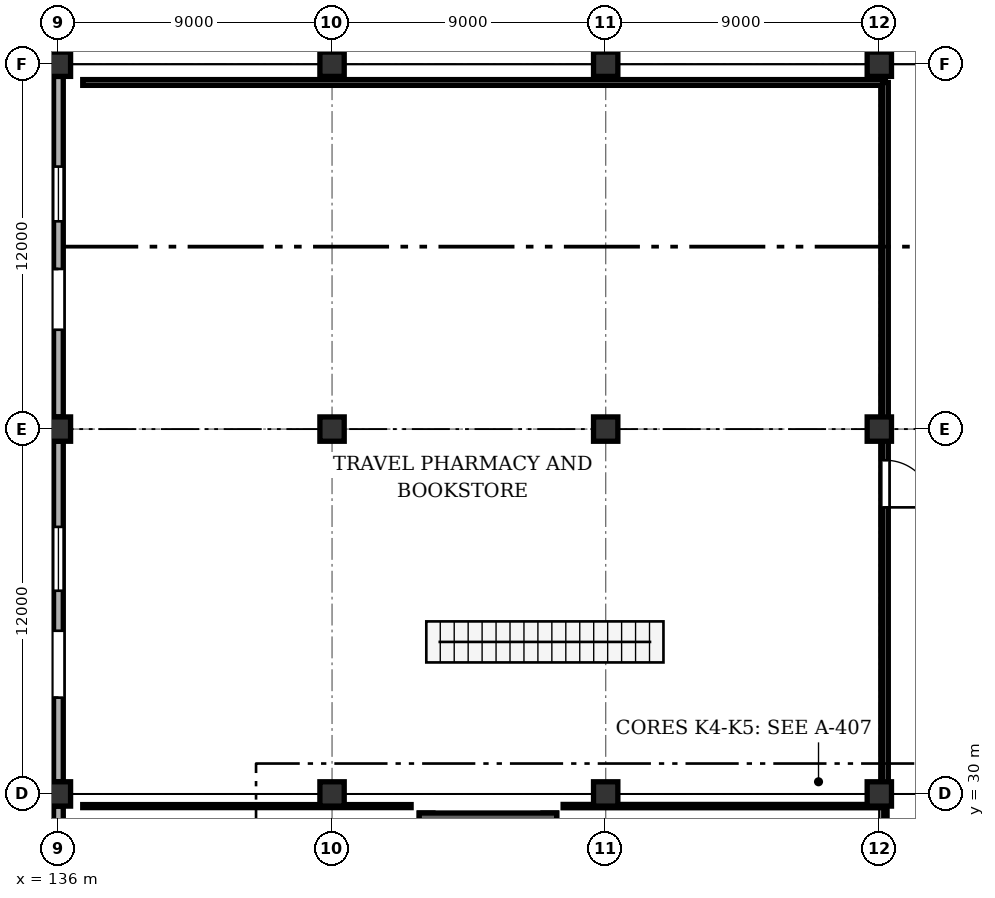
"""IFC4 building model, lengths in metres.
Left out: names, types, materials, properties, quantities, classifications, styles, units other than length and angle.
Written with IfcOpenShell. Run it as: python <this file> out.ifc"""

import sys

from ifc_helpers import new_model, si_unit, direction, frame, frame_2d, origin, origin_2d, place, context, subcontext, project, spatial, rectangle, extrude, element, fill, save


model = new_model("IFC4")
c1 = context("Model", 3, precision=1e-05, world=origin(), true_north=direction((0.0, 1.0)))
c2 = subcontext(c1, "Body", "Model", "MODEL_VIEW")
j1 = project(units=[si_unit("LENGTHUNIT", "METRE"), si_unit("PLANEANGLEUNIT", "RADIAN")], contexts=[c1])
p1 = place(None, origin())
s1 = spatial("IfcSite", under=j1, at=p1, CompositionType="ELEMENT")
p2 = place(p1, origin())
s2 = spatial("IfcBuilding", under=s1, at=p2, CompositionType="ELEMENT")
p3 = place(p2, origin())
s3 = spatial("IfcBuildingStorey", under=s2, at=p3, CompositionType="ELEMENT", Elevation=0.0)
for number, where, z_axis, x_axis in (
    (1, (136.0, 30.0, 0.0), (0.0, 0.0, 1.0), (1.0, 0.0, 0.0)),
    (2, (136.0, 42.0, 0.0), (0.0, 0.0, 1.0), (1.0, 0.0, 0.0)),
    (3, (136.0, 54.0, 0.0), (0.0, 0.0, 1.0), (1.0, 0.0, 0.0)),
    (4, (145.0, 30.0, 0.0), (0.0, 0.0, 1.0), (1.0, 0.0, 0.0)),
    (5, (145.0, 42.0, 0.0), (0.0, 0.0, 1.0), (1.0, 0.0, 0.0)),
    (6, (145.0, 54.0, 0.0), (0.0, 0.0, 1.0), (1.0, 0.0, 0.0)),
    (7, (154.0, 30.0, 0.0), (0.0, 0.0, 1.0), (1.0, 0.0, 0.0)),
    (8, (154.0, 42.0, 0.0), (0.0, 0.0, 1.0), (1.0, 0.0, 0.0)),
    (9, (154.0, 54.0, 0.0), (0.0, 0.0, 1.0), (1.0, 0.0, 0.0)),
    (10, (163.0, 30.0, 0.0), (0.0, 0.0, 1.0), (1.0, 0.0, 0.0)),
    (11, (163.0, 42.0, 0.0), (0.0, 0.0, 1.0), (1.0, 0.0, 0.0)),
    (12, (163.0, 54.0, 0.0), (0.0, 0.0, 1.0), (1.0, 0.0, 0.0)),
):
    element("IfcColumn", number, at=place(p3, frame(where, z_axis=z_axis, x_axis=x_axis)), inside=s3, PredefinedType="COLUMN", context=c2, shape_type="SweptSolid", body=[
        extrude(rectangle(XDim=0.8, YDim=0.8, at=origin_2d()), origin(), (0.0, 0.0, 1.0), 6.6),
    ])
p4 = place(p3, frame((136.0, 18.4, 0.0), z_axis=(0.0, 0.0, 1.0), x_axis=(0.0, 1.0, 0.0)))
e13 = element("IfcWall", 13, at=p4, inside=s3, PredefinedType="SOLIDWALL", context=c2, shape_type="SweptSolid", body=[
    extrude(rectangle(XDim=11.2, YDim=0.32, at=frame_2d((5.6, 0.0))), origin(), (0.0, 0.0, 1.0), 5.785),
])
p5 = place(p3, frame((136.0, 30.4, 0.0), z_axis=(0.0, 0.0, 1.0), x_axis=(0.0, 1.0, 0.0)))
e14 = element("IfcWall", 14, at=p5, inside=s3, PredefinedType="SOLIDWALL", context=c2, shape_type="SweptSolid", body=[
    extrude(rectangle(XDim=11.2, YDim=0.32, at=frame_2d((5.6, 0.0))), origin(), (0.0, 0.0, 1.0), 5.785),
])
p6 = place(p5, frame((2.767, 0.0, 0.0)))
e15 = element("IfcOpeningElement", 15, at=p6, cuts=e14, PredefinedType="OPENING", context=c2, shape_type="SweptSolid", body=[
    extrude(rectangle(XDim=2.2, YDim=2.45, at=frame_2d((1.1, 1.225))), frame((0.0, 0.17, 0.0), z_axis=(0.0, -1.0, 0.0), x_axis=(1.0, 0.0, 0.0)), (0.0, 0.0, 1.0), 0.34),
])
p7 = place(p5, frame((6.283, 0.0, 0.95)))
e16 = element("IfcOpeningElement", 16, at=p7, cuts=e14, PredefinedType="OPENING", context=c2, shape_type="SweptSolid", body=[
    extrude(rectangle(XDim=2.1, YDim=2.0, at=frame_2d((1.05, 1.0))), frame((0.0, 0.17, 0.0), z_axis=(0.0, -1.0, 0.0), x_axis=(1.0, 0.0, 0.0)), (0.0, 0.0, 1.0), 0.34),
])
p8 = place(p3, frame((136.0, 42.4, 0.0), z_axis=(0.0, 0.0, 1.0), x_axis=(0.0, 1.0, 0.0)))
e17 = element("IfcWall", 17, at=p8, inside=s3, PredefinedType="SOLIDWALL", context=c2, shape_type="SweptSolid", body=[
    extrude(rectangle(XDim=11.2, YDim=0.32, at=frame_2d((5.6, 0.0))), origin(), (0.0, 0.0, 1.0), 5.77),
])
p9 = place(p8, frame((2.867, 0.0, 0.0)))
e18 = element("IfcOpeningElement", 18, at=p9, cuts=e17, PredefinedType="OPENING", context=c2, shape_type="SweptSolid", body=[
    extrude(rectangle(XDim=2.0, YDim=2.4, at=frame_2d((1.0, 1.2))), frame((0.0, 0.17, 0.0), z_axis=(0.0, -1.0, 0.0), x_axis=(1.0, 0.0, 0.0)), (0.0, 0.0, 1.0), 0.34),
])
p10 = place(p8, frame((6.433, 0.0, 0.95)))
e19 = element("IfcOpeningElement", 19, at=p10, cuts=e17, PredefinedType="OPENING", context=c2, shape_type="SweptSolid", body=[
    extrude(rectangle(XDim=1.8, YDim=2.0, at=frame_2d((0.9, 1.0))), frame((0.0, 0.17, 0.0), z_axis=(0.0, -1.0, 0.0), x_axis=(1.0, 0.0, 0.0)), (0.0, 0.0, 1.0), 0.34),
])
for number, where, z_axis, x_axis in (
    (20, (152.163, 18.675, 0.0), (0.0, 0.0, 1.0), (0.0, 1.0, 0.0)),
    (21, (148.093, 29.373, 0.0), (0.0, 0.0, 1.0), (0.0, -1.0, 0.0)),
):
    element("IfcWall", number, at=place(p3, frame(where, z_axis=z_axis, x_axis=x_axis)), inside=s3, PredefinedType="SHEAR", context=c2, shape_type="SweptSolid", body=[
        extrude(rectangle(XDim=10.698, YDim=0.45, at=frame_2d((5.349, 0.0))), origin(), (0.0, 0.0, 1.0), 6.36),
    ])
p11 = place(p3, frame((152.387, 29.147, 0.0), z_axis=(0.0, 0.0, 1.0), x_axis=(-1.0, 0.0, 0.0)))
e22 = element("IfcWall", 22, at=p11, inside=s3, PredefinedType="SHEAR", context=c2, shape_type="SweptSolid", body=[
    extrude(rectangle(XDim=4.52, YDim=0.45, at=frame_2d((2.26, 0.0))), origin(), (0.0, 0.0, 1.0), 6.36),
])
p12 = place(p3, frame((152.6, 29.6, 0.0), z_axis=(0.0, 0.0, 1.0), x_axis=(1.0, 0.0, 0.0)))
e23 = element("IfcWall", 23, at=p12, inside=s3, PredefinedType="PARTITIONING", context=c2, shape_type="SweptSolid", body=[
    extrude(rectangle(XDim=10.6, YDim=0.11, at=frame_2d((5.3, 0.0))), origin(), (0.0, 0.0, 1.0), 4.4),
])
p13 = place(p3, frame((163.2, 29.6, 0.0), z_axis=(0.0, 0.0, 1.0), x_axis=(0.0, -1.0, 0.0)))
e24 = element("IfcWall", 24, at=p13, inside=s3, PredefinedType="PARTITIONING", context=c2, shape_type="SweptSolid", body=[
    extrude(rectangle(XDim=12.8, YDim=0.11, at=frame_2d((6.4, 0.0))), origin(), (0.0, 0.0, 1.0), 4.4),
])
p14 = place(p13, frame((5.625, 0.0, 0.0)))
e25 = element("IfcOpeningElement", 25, at=p14, cuts=e24, PredefinedType="OPENING", context=c2, shape_type="SweptSolid", body=[
    extrude(rectangle(XDim=1.55, YDim=2.1, at=frame_2d((0.775, 1.05))), frame((0.0, 0.065, 0.0), z_axis=(0.0, -1.0, 0.0), x_axis=(1.0, 0.0, 0.0)), (0.0, 0.0, 1.0), 0.13),
])
p15 = place(p3, frame((136.8, 29.6, 0.0), z_axis=(0.0, 0.0, 1.0), x_axis=(1.0, 0.0, 0.0)))
e26 = element("IfcWall", 26, at=p15, inside=s3, PredefinedType="PARTITIONING", context=c2, shape_type="SweptSolid", body=[
    extrude(rectangle(XDim=10.8, YDim=0.1, at=frame_2d((5.4, 0.0))), origin(), (0.0, 0.0, 1.0), 4.4),
])
p16 = place(p3, frame((136.8, 53.4, 0.0), z_axis=(0.0, 0.0, 1.0), x_axis=(1.0, 0.0, 0.0)))
e27 = element("IfcWall", 27, at=p16, inside=s3, PredefinedType="PARTITIONING", context=c2, shape_type="SweptSolid", body=[
    extrude(rectangle(XDim=26.4, YDim=0.19, at=frame_2d((13.2, 0.0))), origin(), (0.0, 0.0, 1.0), 4.4),
])
p17 = place(p3, frame((163.2, 53.4, 0.0), z_axis=(0.0, 0.0, 1.0), x_axis=(0.0, -1.0, 0.0)))
e28 = element("IfcWall", 28, at=p17, inside=s3, PredefinedType="PARTITIONING", context=c2, shape_type="SweptSolid", body=[
    extrude(rectangle(XDim=23.2, YDim=0.19, at=frame_2d((11.6, 0.0))), origin(), (0.0, 0.0, 1.0), 4.4),
])
p18 = place(p17, frame((12.425, 0.0, 0.0)))
e29 = element("IfcOpeningElement", 29, at=p18, cuts=e28, PredefinedType="OPENING", context=c2, shape_type="SweptSolid", body=[
    extrude(rectangle(XDim=1.55, YDim=2.1, at=frame_2d((0.775, 1.05))), frame((0.0, 0.105, 0.0), z_axis=(0.0, -1.0, 0.0), x_axis=(1.0, 0.0, 0.0)), (0.0, 0.0, 1.0), 0.21),
])
p19 = place(p6, origin())
e30 = element("IfcDoor", 30, at=p19, inside=s3, OperationType="SINGLE_SWING_LEFT", PredefinedType="DOOR", context=c2, shape_type="SweptSolid", body=[
    extrude(rectangle(XDim=2.2, YDim=2.45, at=frame_2d((1.1, 1.225))), frame((0.0, 0.025, 0.0), z_axis=(0.0, -1.0, 0.0), x_axis=(1.0, 0.0, 0.0)), (0.0, 0.0, 1.0), 0.05),
])
fill(e15, e30)
p20 = place(p7, origin())
e31 = element("IfcWindow", 31, at=p20, inside=s3, PartitioningType="SINGLE_PANEL", PredefinedType="WINDOW", context=c2, shape_type="SweptSolid", body=[
    extrude(rectangle(XDim=2.1, YDim=2.0, at=frame_2d((1.05, 1.0))), frame((0.0, 0.03, 0.0), z_axis=(0.0, -1.0, 0.0), x_axis=(1.0, 0.0, 0.0)), (0.0, 0.0, 1.0), 0.06),
])
fill(e16, e31)
p21 = place(p9, origin())
e32 = element("IfcDoor", 32, at=p21, inside=s3, OperationType="SINGLE_SWING_RIGHT", PredefinedType="DOOR", context=c2, shape_type="SweptSolid", body=[
    extrude(rectangle(XDim=2.0, YDim=2.4, at=frame_2d((1.0, 1.2))), frame((0.0, 0.025, 0.0), z_axis=(0.0, -1.0, 0.0), x_axis=(1.0, 0.0, 0.0)), (0.0, 0.0, 1.0), 0.05),
])
fill(e18, e32)
p22 = place(p10, origin())
e33 = element("IfcWindow", 33, at=p22, inside=s3, PartitioningType="SINGLE_PANEL", PredefinedType="WINDOW", context=c2, shape_type="SweptSolid", body=[
    extrude(rectangle(XDim=1.8, YDim=2.0, at=frame_2d((0.9, 1.0))), frame((0.0, 0.03, 0.0), z_axis=(0.0, -1.0, 0.0), x_axis=(1.0, 0.0, 0.0)), (0.0, 0.0, 1.0), 0.06),
])
fill(e19, e33)
p23 = place(p18, origin())
e34 = element("IfcDoor", 34, at=p23, inside=s3, OperationType="SINGLE_SWING_RIGHT", PredefinedType="DOOR", context=c2, shape_type="SweptSolid", body=[
    extrude(rectangle(XDim=1.55, YDim=2.1, at=frame_2d((0.775, 1.05))), frame((0.0, 0.025, 0.0), z_axis=(0.0, -1.0, 0.0), x_axis=(1.0, 0.0, 0.0)), (0.0, 0.0, 1.0), 0.05),
])
fill(e29, e34)
save(model, sys.argv[1])
